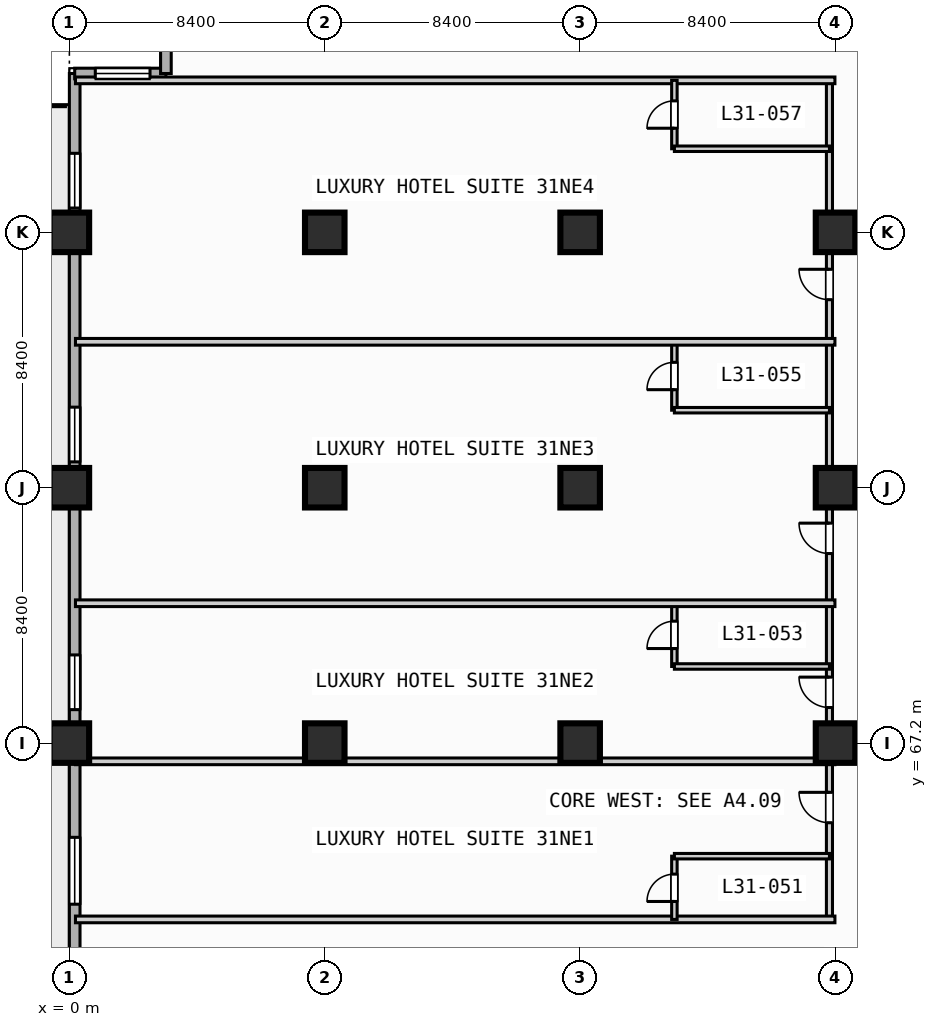
"""IFC4 building model, lengths in metres.
Left out: names, types, materials, properties, quantities, classifications, styles, units other than length and angle.
Written with IfcOpenShell. Run it as: python <this file> out.ifc"""

import sys

from ifc_helpers import new_model, si_unit, direction, frame, frame_2d, origin, origin_2d, place, context, subcontext, project, spatial, rectangle, extrude, element, fill, save


model = new_model("IFC4")
c1 = context("Model", 3, precision=1e-05, world=origin(), true_north=direction((0.0, 1.0)))
c2 = subcontext(c1, "Body", "Model", "MODEL_VIEW")
j1 = project(units=[si_unit("LENGTHUNIT", "METRE"), si_unit("PLANEANGLEUNIT", "RADIAN")], contexts=[c1])
p1 = place(None, origin())
s1 = spatial("IfcSite", under=j1, at=p1, CompositionType="ELEMENT")
p2 = place(p1, origin())
s2 = spatial("IfcBuilding", under=s1, at=p2, CompositionType="ELEMENT")
p3 = place(p2, frame((0.0, 0.0, 130.4)))
s3 = spatial("IfcBuildingStorey", under=s2, at=p3, CompositionType="ELEMENT", Elevation=130.4)
for number, where, z_axis, x_axis in (
    (1, (0.0, 67.2, 0.0), (0.0, 0.0, 1.0), (1.0, 0.0, 0.0)),
    (2, (0.0, 75.6, 0.0), (0.0, 0.0, 1.0), (1.0, 0.0, 0.0)),
    (3, (0.0, 84.0, 0.0), (0.0, 0.0, 1.0), (1.0, 0.0, 0.0)),
    (4, (8.4, 67.2, 0.0), (0.0, 0.0, 1.0), (1.0, 0.0, 0.0)),
    (5, (8.4, 75.6, 0.0), (0.0, 0.0, 1.0), (1.0, 0.0, 0.0)),
    (6, (8.4, 84.0, 0.0), (0.0, 0.0, 1.0), (1.0, 0.0, 0.0)),
    (7, (16.8, 67.2, 0.0), (0.0, 0.0, 1.0), (1.0, 0.0, 0.0)),
    (8, (16.8, 75.6, 0.0), (0.0, 0.0, 1.0), (1.0, 0.0, 0.0)),
    (9, (16.8, 84.0, 0.0), (0.0, 0.0, 1.0), (1.0, 0.0, 0.0)),
    (10, (25.2, 67.2, 0.0), (0.0, 0.0, 1.0), (1.0, 0.0, 0.0)),
    (11, (25.2, 75.6, 0.0), (0.0, 0.0, 1.0), (1.0, 0.0, 0.0)),
    (12, (25.2, 84.0, 0.0), (0.0, 0.0, 1.0), (1.0, 0.0, 0.0)),
):
    element("IfcColumn", number, at=place(p3, frame(where, z_axis=z_axis, x_axis=x_axis)), inside=s3, PredefinedType="COLUMN", context=c2, shape_type="SweptSolid", body=[
        extrude(rectangle(XDim=1.3, YDim=1.3, at=origin_2d()), origin(), (0.0, 0.0, 1.0), 3.8),
    ])
p4 = place(p3, frame((0.175, 3.175, 0.0), z_axis=(0.0, 0.0, 1.0), x_axis=(0.0, 1.0, 0.0)))
e13 = element("IfcWall", 13, at=p4, inside=s3, PredefinedType="STANDARD", context=c2, shape_type="SweptSolid", body=[
    extrude(rectangle(XDim=86.05, YDim=0.35, at=frame_2d((43.025, 0.0))), origin(), (0.0, 0.0, 1.0), 3.55),
])
p5 = place(p4, frame((42.325, 0.0, 0.0)))
e14 = element("IfcOpeningElement", 14, at=p5, cuts=e13, PredefinedType="OPENING", context=c2, shape_type="SweptSolid", body=[
    extrude(rectangle(XDim=1.4, YDim=2.2, at=frame_2d((0.7, 1.1))), frame((0.0, 0.185, 0.0), z_axis=(0.0, -1.0, 0.0), x_axis=(1.0, 0.0, 0.0)), (0.0, 0.0, 1.0), 0.37),
])
p6 = place(p4, frame((33.525, 0.0, 0.85)))
e15 = element("IfcOpeningElement", 15, at=p6, cuts=e13, PredefinedType="OPENING", context=c2, shape_type="SweptSolid", body=[
    extrude(rectangle(XDim=2.2, YDim=1.8, at=frame_2d((1.1, 0.9))), frame((0.0, 0.185, 0.0), z_axis=(0.0, -1.0, 0.0), x_axis=(1.0, 0.0, 0.0)), (0.0, 0.0, 1.0), 0.37),
])
p7 = place(p4, frame((58.725, 0.0, 0.85)))
e16 = element("IfcOpeningElement", 16, at=p7, cuts=e13, PredefinedType="OPENING", context=c2, shape_type="SweptSolid", body=[
    extrude(rectangle(XDim=2.2, YDim=1.8, at=frame_2d((1.1, 0.9))), frame((0.0, 0.185, 0.0), z_axis=(0.0, -1.0, 0.0), x_axis=(1.0, 0.0, 0.0)), (0.0, 0.0, 1.0), 0.37),
])
p8 = place(p4, frame((65.125, 0.0, 0.85)))
e17 = element("IfcOpeningElement", 17, at=p8, cuts=e13, PredefinedType="OPENING", context=c2, shape_type="SweptSolid", body=[
    extrude(rectangle(XDim=1.8, YDim=1.8, at=frame_2d((0.9, 0.9))), frame((0.0, 0.185, 0.0), z_axis=(0.0, -1.0, 0.0), x_axis=(1.0, 0.0, 0.0)), (0.0, 0.0, 1.0), 0.37),
])
p9 = place(p4, frame((73.275, 0.0, 0.85)))
e18 = element("IfcOpeningElement", 18, at=p9, cuts=e13, PredefinedType="OPENING", context=c2, shape_type="SweptSolid", body=[
    extrude(rectangle(XDim=1.8, YDim=1.8, at=frame_2d((0.9, 0.9))), frame((0.0, 0.185, 0.0), z_axis=(0.0, -1.0, 0.0), x_axis=(1.0, 0.0, 0.0)), (0.0, 0.0, 1.0), 0.37),
])
p10 = place(p4, frame((81.625, 0.0, 0.85)))
e19 = element("IfcOpeningElement", 19, at=p10, cuts=e13, PredefinedType="OPENING", context=c2, shape_type="SweptSolid", body=[
    extrude(rectangle(XDim=1.8, YDim=1.8, at=frame_2d((0.9, 0.9))), frame((0.0, 0.185, 0.0), z_axis=(0.0, -1.0, 0.0), x_axis=(1.0, 0.0, 0.0)), (0.0, 0.0, 1.0), 0.37),
])
p11 = place(p3, frame((0.175, 89.225, 0.0), z_axis=(0.0, 0.0, 1.0), x_axis=(1.0, 0.0, 0.0)))
e20 = element("IfcWall", 20, at=p11, inside=s3, PredefinedType="STANDARD", context=c2, shape_type="SweptSolid", body=[
    extrude(rectangle(XDim=3.0, YDim=0.35, at=frame_2d((1.5, 0.0))), origin(), (0.0, 0.0, 1.0), 3.55),
])
p12 = place(p11, frame((0.677, 0.0, 0.85)))
e21 = element("IfcOpeningElement", 21, at=p12, cuts=e20, PredefinedType="OPENING", context=c2, shape_type="SweptSolid", body=[
    extrude(rectangle(XDim=1.8, YDim=1.8, at=frame_2d((0.9, 0.9))), frame((0.0, 0.185, 0.0), z_axis=(0.0, -1.0, 0.0), x_axis=(1.0, 0.0, 0.0)), (0.0, 0.0, 1.0), 0.37),
])
p13 = place(p3, frame((3.175, 89.225, 0.0), z_axis=(0.0, 0.0, 1.0), x_axis=(0.0, 1.0, 0.0)))
e22 = element("IfcWall", 22, at=p13, inside=s3, PredefinedType="STANDARD", context=c2, shape_type="SweptSolid", body=[
    extrude(rectangle(XDim=3.0, YDim=0.35, at=frame_2d((1.5, 0.0))), origin(), (0.0, 0.0, 1.0), 3.55),
])
p14 = place(p3, frame((25.0, 61.4, 0.0), z_axis=(0.0, 0.0, 1.0), x_axis=(0.0, 1.0, 0.0)))
e23 = element("IfcWall", 23, at=p14, inside=s3, PredefinedType="PARTITIONING", context=c2, shape_type="SweptSolid", body=[
    extrude(rectangle(XDim=27.6, YDim=0.2, at=frame_2d((13.8, 0.0))), origin(), (0.0, 0.0, 1.0), 2.8),
])
p15 = place(p14, frame((3.18, 0.0, 0.0)))
e24 = element("IfcOpeningElement", 24, at=p15, cuts=e23, PredefinedType="OPENING", context=c2, shape_type="SweptSolid", body=[
    extrude(rectangle(XDim=1.0, YDim=2.15, at=frame_2d((0.5, 1.075))), frame((0.0, 0.11, 0.0), z_axis=(0.0, -1.0, 0.0), x_axis=(1.0, 0.0, 0.0)), (0.0, 0.0, 1.0), 0.22),
])
p16 = place(p14, frame((6.97, 0.0, 0.0)))
e25 = element("IfcOpeningElement", 25, at=p16, cuts=e23, PredefinedType="OPENING", context=c2, shape_type="SweptSolid", body=[
    extrude(rectangle(XDim=1.0, YDim=2.15, at=frame_2d((0.5, 1.075))), frame((0.0, 0.11, 0.0), z_axis=(0.0, -1.0, 0.0), x_axis=(1.0, 0.0, 0.0)), (0.0, 0.0, 1.0), 0.22),
])
p17 = place(p14, frame((12.035, 0.0, 0.0)))
e26 = element("IfcOpeningElement", 26, at=p17, cuts=e23, PredefinedType="OPENING", context=c2, shape_type="SweptSolid", body=[
    extrude(rectangle(XDim=1.0, YDim=2.15, at=frame_2d((0.5, 1.075))), frame((0.0, 0.11, 0.0), z_axis=(0.0, -1.0, 0.0), x_axis=(1.0, 0.0, 0.0)), (0.0, 0.0, 1.0), 0.22),
])
p18 = place(p14, frame((20.385, 0.0, 0.0)))
e27 = element("IfcOpeningElement", 27, at=p18, cuts=e23, PredefinedType="OPENING", context=c2, shape_type="SweptSolid", body=[
    extrude(rectangle(XDim=1.0, YDim=2.15, at=frame_2d((0.5, 1.075))), frame((0.0, 0.11, 0.0), z_axis=(0.0, -1.0, 0.0), x_axis=(1.0, 0.0, 0.0)), (0.0, 0.0, 1.0), 0.22),
])
p19 = place(p3, frame((0.2, 61.4, 0.0), z_axis=(0.0, 0.0, 1.0), x_axis=(1.0, 0.0, 0.0)))
e28 = element("IfcWall", 28, at=p19, inside=s3, PredefinedType="PARTITIONING", context=c2, shape_type="SweptSolid", body=[
    extrude(rectangle(XDim=24.98, YDim=0.22, at=frame_2d((12.49, 0.0))), origin(), (0.0, 0.0, 1.0), 3.55),
])
p20 = place(p3, frame((19.9, 61.4, 0.0), z_axis=(0.0, 0.0, 1.0), x_axis=(0.0, 1.0, 0.0)))
e29 = element("IfcWall", 29, at=p20, inside=s3, PredefinedType="PLUMBINGWALL", context=c2, shape_type="SweptSolid", body=[
    extrude(rectangle(XDim=2.08, YDim=0.18, at=frame_2d((1.04, 0.0))), origin(), (0.0, 0.0, 1.0), 3.55),
])
p21 = place(p20, frame((0.59, 0.0, 0.0)))
e30 = element("IfcOpeningElement", 30, at=p21, cuts=e29, PredefinedType="OPENING", context=c2, shape_type="SweptSolid", body=[
    extrude(rectangle(XDim=0.9, YDim=2.1, at=frame_2d((0.45, 1.05))), frame((0.0, 0.1, 0.0), z_axis=(0.0, -1.0, 0.0), x_axis=(1.0, 0.0, 0.0)), (0.0, 0.0, 1.0), 0.2),
])
p22 = place(p3, frame((19.9, 63.48, 0.0), z_axis=(0.0, 0.0, 1.0), x_axis=(1.0, 0.0, 0.0)))
e31 = element("IfcWall", 31, at=p22, inside=s3, PredefinedType="PLUMBINGWALL", context=c2, shape_type="SweptSolid", body=[
    extrude(rectangle(XDim=5.1, YDim=0.18, at=frame_2d((2.55, 0.0))), origin(), (0.0, 0.0, 1.0), 3.55),
])
p23 = place(p3, frame((0.2, 66.6, 0.0), z_axis=(0.0, 0.0, 1.0), x_axis=(1.0, 0.0, 0.0)))
e32 = element("IfcWall", 32, at=p23, inside=s3, PredefinedType="PARTITIONING", context=c2, shape_type="SweptSolid", body=[
    extrude(rectangle(XDim=24.98, YDim=0.22, at=frame_2d((12.49, 0.0))), origin(), (0.0, 0.0, 1.0), 3.55),
])
p24 = place(p3, frame((19.9, 69.72, 0.0), z_axis=(0.0, 0.0, 1.0), x_axis=(0.0, 1.0, 0.0)))
e33 = element("IfcWall", 33, at=p24, inside=s3, PredefinedType="PLUMBINGWALL", context=c2, shape_type="SweptSolid", body=[
    extrude(rectangle(XDim=2.08, YDim=0.18, at=frame_2d((1.04, 0.0))), origin(), (0.0, 0.0, 1.0), 3.55),
])
p25 = place(p24, frame((0.59, 0.0, 0.0)))
e34 = element("IfcOpeningElement", 34, at=p25, cuts=e33, PredefinedType="OPENING", context=c2, shape_type="SweptSolid", body=[
    extrude(rectangle(XDim=0.9, YDim=2.1, at=frame_2d((0.45, 1.05))), frame((0.0, 0.1, 0.0), z_axis=(0.0, -1.0, 0.0), x_axis=(1.0, 0.0, 0.0)), (0.0, 0.0, 1.0), 0.2),
])
p26 = place(p3, frame((19.9, 69.72, 0.0), z_axis=(0.0, 0.0, 1.0), x_axis=(1.0, 0.0, 0.0)))
e35 = element("IfcWall", 35, at=p26, inside=s3, PredefinedType="PLUMBINGWALL", context=c2, shape_type="SweptSolid", body=[
    extrude(rectangle(XDim=5.1, YDim=0.18, at=frame_2d((2.55, 0.0))), origin(), (0.0, 0.0, 1.0), 3.55),
])
p27 = place(p3, frame((0.2, 71.8, 0.0), z_axis=(0.0, 0.0, 1.0), x_axis=(1.0, 0.0, 0.0)))
e36 = element("IfcWall", 36, at=p27, inside=s3, PredefinedType="PARTITIONING", context=c2, shape_type="SweptSolid", body=[
    extrude(rectangle(XDim=24.98, YDim=0.22, at=frame_2d((12.49, 0.0))), origin(), (0.0, 0.0, 1.0), 3.55),
])
p28 = place(p3, frame((19.9, 78.15, 0.0), z_axis=(0.0, 0.0, 1.0), x_axis=(0.0, 1.0, 0.0)))
e37 = element("IfcWall", 37, at=p28, inside=s3, PredefinedType="PLUMBINGWALL", context=c2, shape_type="SweptSolid", body=[
    extrude(rectangle(XDim=2.25, YDim=0.18, at=frame_2d((1.125, 0.0))), origin(), (0.0, 0.0, 1.0), 3.55),
])
p29 = place(p28, frame((0.675, 0.0, 0.0)))
e38 = element("IfcOpeningElement", 38, at=p29, cuts=e37, PredefinedType="OPENING", context=c2, shape_type="SweptSolid", body=[
    extrude(rectangle(XDim=0.9, YDim=2.1, at=frame_2d((0.45, 1.05))), frame((0.0, 0.1, 0.0), z_axis=(0.0, -1.0, 0.0), x_axis=(1.0, 0.0, 0.0)), (0.0, 0.0, 1.0), 0.2),
])
p30 = place(p3, frame((19.9, 78.15, 0.0), z_axis=(0.0, 0.0, 1.0), x_axis=(1.0, 0.0, 0.0)))
e39 = element("IfcWall", 39, at=p30, inside=s3, PredefinedType="PLUMBINGWALL", context=c2, shape_type="SweptSolid", body=[
    extrude(rectangle(XDim=5.1, YDim=0.18, at=frame_2d((2.55, 0.0))), origin(), (0.0, 0.0, 1.0), 3.55),
])
for number, where, z_axis, x_axis in (
    (40, (0.2, 80.4, 0.0), (0.0, 0.0, 1.0), (1.0, 0.0, 0.0)),
    (41, (0.2, 89.0, 0.0), (0.0, 0.0, 1.0), (1.0, 0.0, 0.0)),
):
    element("IfcWall", number, at=place(p3, frame(where, z_axis=z_axis, x_axis=x_axis)), inside=s3, PredefinedType="PARTITIONING", context=c2, shape_type="SweptSolid", body=[
        extrude(rectangle(XDim=24.98, YDim=0.22, at=frame_2d((12.49, 0.0))), origin(), (0.0, 0.0, 1.0), 3.55),
    ])
p31 = place(p3, frame((19.9, 86.75, 0.0), z_axis=(0.0, 0.0, 1.0), x_axis=(0.0, 1.0, 0.0)))
e42 = element("IfcWall", 42, at=p31, inside=s3, PredefinedType="PLUMBINGWALL", context=c2, shape_type="SweptSolid", body=[
    extrude(rectangle(XDim=2.25, YDim=0.18, at=frame_2d((1.125, 0.0))), origin(), (0.0, 0.0, 1.0), 3.55),
])
p32 = place(p31, frame((0.675, 0.0, 0.0)))
e43 = element("IfcOpeningElement", 43, at=p32, cuts=e42, PredefinedType="OPENING", context=c2, shape_type="SweptSolid", body=[
    extrude(rectangle(XDim=0.9, YDim=2.1, at=frame_2d((0.45, 1.05))), frame((0.0, 0.1, 0.0), z_axis=(0.0, -1.0, 0.0), x_axis=(1.0, 0.0, 0.0)), (0.0, 0.0, 1.0), 0.2),
])
p33 = place(p3, frame((19.9, 86.75, 0.0), z_axis=(0.0, 0.0, 1.0), x_axis=(1.0, 0.0, 0.0)))
e44 = element("IfcWall", 44, at=p33, inside=s3, PredefinedType="PLUMBINGWALL", context=c2, shape_type="SweptSolid", body=[
    extrude(rectangle(XDim=5.1, YDim=0.18, at=frame_2d((2.55, 0.0))), origin(), (0.0, 0.0, 1.0), 3.55),
])
p34 = place(p7, origin())
e45 = element("IfcWindow", 45, at=p34, inside=s3, PartitioningType="SINGLE_PANEL", PredefinedType="WINDOW", context=c2, shape_type="SweptSolid", body=[
    extrude(rectangle(XDim=2.2, YDim=1.8, at=frame_2d((1.1, 0.9))), frame((0.0, 0.03, 0.0), z_axis=(0.0, -1.0, 0.0), x_axis=(1.0, 0.0, 0.0)), (0.0, 0.0, 1.0), 0.06),
])
fill(e16, e45)
p35 = place(p8, origin())
e46 = element("IfcWindow", 46, at=p35, inside=s3, PartitioningType="SINGLE_PANEL", PredefinedType="WINDOW", context=c2, shape_type="SweptSolid", body=[
    extrude(rectangle(XDim=1.8, YDim=1.8, at=frame_2d((0.9, 0.9))), frame((0.0, 0.03, 0.0), z_axis=(0.0, -1.0, 0.0), x_axis=(1.0, 0.0, 0.0)), (0.0, 0.0, 1.0), 0.06),
])
fill(e17, e46)
p36 = place(p9, origin())
e47 = element("IfcWindow", 47, at=p36, inside=s3, PartitioningType="SINGLE_PANEL", PredefinedType="WINDOW", context=c2, shape_type="SweptSolid", body=[
    extrude(rectangle(XDim=1.8, YDim=1.8, at=frame_2d((0.9, 0.9))), frame((0.0, 0.03, 0.0), z_axis=(0.0, -1.0, 0.0), x_axis=(1.0, 0.0, 0.0)), (0.0, 0.0, 1.0), 0.06),
])
fill(e18, e47)
p37 = place(p10, origin())
e48 = element("IfcWindow", 48, at=p37, inside=s3, PartitioningType="SINGLE_PANEL", PredefinedType="WINDOW", context=c2, shape_type="SweptSolid", body=[
    extrude(rectangle(XDim=1.8, YDim=1.8, at=frame_2d((0.9, 0.9))), frame((0.0, 0.03, 0.0), z_axis=(0.0, -1.0, 0.0), x_axis=(1.0, 0.0, 0.0)), (0.0, 0.0, 1.0), 0.06),
])
fill(e19, e48)
p38 = place(p12, origin())
e49 = element("IfcWindow", 49, at=p38, inside=s3, PartitioningType="SINGLE_PANEL", PredefinedType="WINDOW", context=c2, shape_type="SweptSolid", body=[
    extrude(rectangle(XDim=1.8, YDim=1.8, at=frame_2d((0.9, 0.9))), frame((0.0, 0.03, 0.0), z_axis=(0.0, -1.0, 0.0), x_axis=(1.0, 0.0, 0.0)), (0.0, 0.0, 1.0), 0.06),
])
fill(e21, e49)
p39 = place(p15, origin())
e50 = element("IfcDoor", 50, at=p39, inside=s3, OperationType="SINGLE_SWING_RIGHT", PredefinedType="DOOR", context=c2, shape_type="SweptSolid", body=[
    extrude(rectangle(XDim=1.0, YDim=2.15, at=frame_2d((0.5, 1.075))), frame((0.0, 0.025, 0.0), z_axis=(0.0, -1.0, 0.0), x_axis=(1.0, 0.0, 0.0)), (0.0, 0.0, 1.0), 0.05),
])
fill(e24, e50)
p40 = place(p16, origin())
e51 = element("IfcDoor", 51, at=p40, inside=s3, OperationType="SINGLE_SWING_RIGHT", PredefinedType="DOOR", context=c2, shape_type="SweptSolid", body=[
    extrude(rectangle(XDim=1.0, YDim=2.15, at=frame_2d((0.5, 1.075))), frame((0.0, 0.025, 0.0), z_axis=(0.0, -1.0, 0.0), x_axis=(1.0, 0.0, 0.0)), (0.0, 0.0, 1.0), 0.05),
])
fill(e25, e51)
p41 = place(p17, origin())
e52 = element("IfcDoor", 52, at=p41, inside=s3, OperationType="SINGLE_SWING_RIGHT", PredefinedType="DOOR", context=c2, shape_type="SweptSolid", body=[
    extrude(rectangle(XDim=1.0, YDim=2.15, at=frame_2d((0.5, 1.075))), frame((0.0, 0.025, 0.0), z_axis=(0.0, -1.0, 0.0), x_axis=(1.0, 0.0, 0.0)), (0.0, 0.0, 1.0), 0.05),
])
fill(e26, e52)
p42 = place(p18, origin())
e53 = element("IfcDoor", 53, at=p42, inside=s3, OperationType="SINGLE_SWING_RIGHT", PredefinedType="DOOR", context=c2, shape_type="SweptSolid", body=[
    extrude(rectangle(XDim=1.0, YDim=2.15, at=frame_2d((0.5, 1.075))), frame((0.0, 0.025, 0.0), z_axis=(0.0, -1.0, 0.0), x_axis=(1.0, 0.0, 0.0)), (0.0, 0.0, 1.0), 0.05),
])
fill(e27, e53)
p43 = place(p21, origin())
e54 = element("IfcDoor", 54, at=p43, inside=s3, OperationType="SINGLE_SWING_LEFT", PredefinedType="DOOR", context=c2, shape_type="SweptSolid", body=[
    extrude(rectangle(XDim=0.9, YDim=2.1, at=frame_2d((0.45, 1.05))), frame((0.0, 0.025, 0.0), z_axis=(0.0, -1.0, 0.0), x_axis=(1.0, 0.0, 0.0)), (0.0, 0.0, 1.0), 0.05),
])
fill(e30, e54)
p44 = place(p25, origin())
e55 = element("IfcDoor", 55, at=p44, inside=s3, OperationType="SINGLE_SWING_LEFT", PredefinedType="DOOR", context=c2, shape_type="SweptSolid", body=[
    extrude(rectangle(XDim=0.9, YDim=2.1, at=frame_2d((0.45, 1.05))), frame((0.0, 0.025, 0.0), z_axis=(0.0, -1.0, 0.0), x_axis=(1.0, 0.0, 0.0)), (0.0, 0.0, 1.0), 0.05),
])
fill(e34, e55)
p45 = place(p29, origin())
e56 = element("IfcDoor", 56, at=p45, inside=s3, OperationType="SINGLE_SWING_LEFT", PredefinedType="DOOR", context=c2, shape_type="SweptSolid", body=[
    extrude(rectangle(XDim=0.9, YDim=2.1, at=frame_2d((0.45, 1.05))), frame((0.0, 0.025, 0.0), z_axis=(0.0, -1.0, 0.0), x_axis=(1.0, 0.0, 0.0)), (0.0, 0.0, 1.0), 0.05),
])
fill(e38, e56)
p46 = place(p32, origin())
e57 = element("IfcDoor", 57, at=p46, inside=s3, OperationType="SINGLE_SWING_LEFT", PredefinedType="DOOR", context=c2, shape_type="SweptSolid", body=[
    extrude(rectangle(XDim=0.9, YDim=2.1, at=frame_2d((0.45, 1.05))), frame((0.0, 0.025, 0.0), z_axis=(0.0, -1.0, 0.0), x_axis=(1.0, 0.0, 0.0)), (0.0, 0.0, 1.0), 0.05),
])
fill(e43, e57)
save(model, sys.argv[1])
